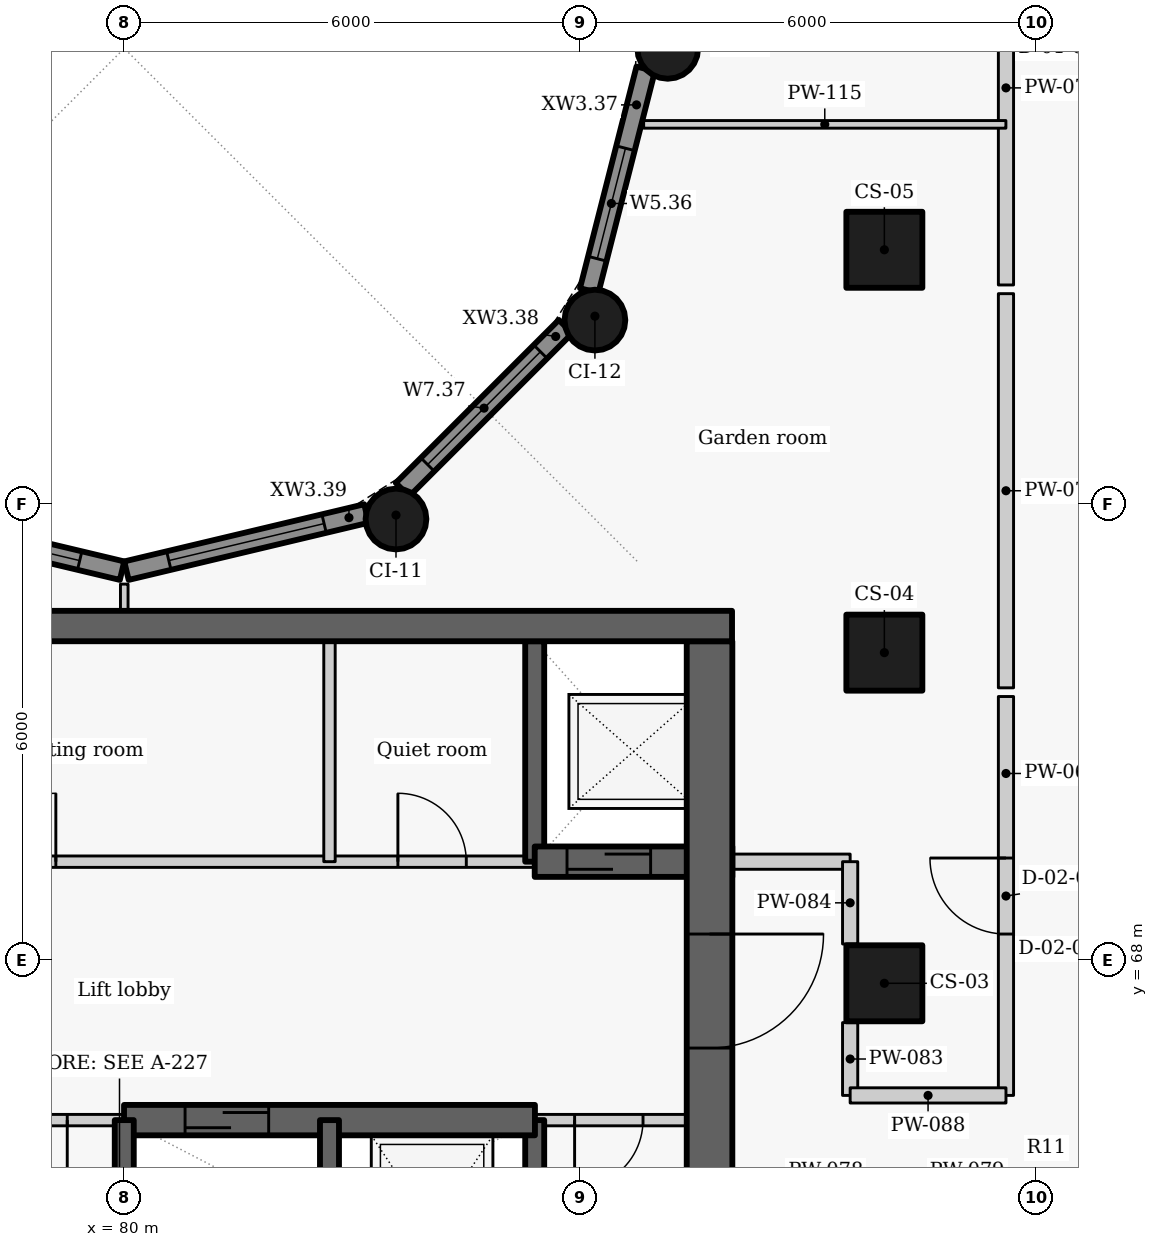
"""IFC4 building model, lengths in metres.
Left out: names, types, materials, properties, quantities, classifications, styles, units other than length and angle.
Written with IfcOpenShell. Run it as: python <this file> out.ifc"""

import sys

from ifc_helpers import new_model, si_unit, direction, frame, frame_2d, origin, origin_2d, place, context, subcontext, project, spatial, rectangle, circle, extrude, element, fill, save


model = new_model("IFC4")
c1 = context("Model", 3, precision=1e-05, world=origin(), true_north=direction((0.0, 1.0)))
c2 = subcontext(c1, "Body", "Model", "MODEL_VIEW")
j1 = project(units=[si_unit("LENGTHUNIT", "METRE"), si_unit("PLANEANGLEUNIT", "RADIAN")], contexts=[c1])
p1 = place(None, origin())
s1 = spatial("IfcSite", under=j1, at=p1, CompositionType="ELEMENT")
p2 = place(p1, origin())
s2 = spatial("IfcBuilding", under=s1, at=p2, CompositionType="ELEMENT")
p3 = place(p2, frame((0.0, 0.0, 150.3)))
s3 = spatial("IfcBuildingStorey", under=s2, at=p3, CompositionType="ELEMENT", Elevation=150.3)
for number, where, z_axis, x_axis in (
    (1, (90.0, 67.7, 0.0), (0.0, 0.0, 1.0), (0.0, 1.0, 0.0)),
    (2, (90.0, 72.05, 0.0), (0.0, 0.0, 1.0), (0.0, 1.0, 0.0)),
    (3, (90.0, 77.35, 0.0), (0.0, 0.0, 1.0), (0.0, 1.0, 0.0)),
):
    element("IfcColumn", number, at=place(p3, frame(where, z_axis=z_axis, x_axis=x_axis)), inside=s3, PredefinedType="COLUMN", context=c2, shape_type="SweptSolid", body=[
        extrude(rectangle(XDim=1.0, YDim=1.0, at=origin_2d()), origin(), (0.0, 0.0, 1.0), 3.3),
    ])
for number, where, z_axis, x_axis in (
    (4, (87.15, 80.0, 0.0), (0.0, 0.0, 1.0), (0.0, 1.0, 0.0)),
    (5, (83.575, 73.808, 0.0), (0.0, 0.0, 1.0), (0.866, 0.5, 0.0)),
    (6, (86.192, 76.425, 0.0), (0.0, 0.0, 1.0), (0.5, 0.866, 0.0)),
):
    element("IfcColumn", number, at=place(p3, frame(where, z_axis=z_axis, x_axis=x_axis)), inside=s3, PredefinedType="COLUMN", context=c2, shape_type="SweptSolid", body=[
        extrude(circle(Radius=0.4, at=origin_2d()), origin(), (0.0, 0.0, 1.0), 3.3),
    ])
p4 = place(p3, frame((86.86, 79.73, 0.0), z_axis=(0.0, 0.0, 1.0), x_axis=(-0.247055971283, -0.969001211069, 0.0)))
e7 = element("IfcWall", 7, at=p4, inside=s3, PredefinedType="SOLIDWALL", context=c2, shape_type="SweptSolid", body=[
    extrude(rectangle(XDim=3.01, YDim=0.25, at=frame_2d((1.505, 0.0))), origin(), (0.0, 0.0, 1.0), 2.425),
])
p5 = place(p4, frame((1.077, 0.0, 0.9)))
e8 = element("IfcOpeningElement", 8, at=p5, cuts=e7, PredefinedType="OPENING", context=c2, shape_type="SweptSolid", body=[
    extrude(rectangle(XDim=1.5, YDim=1.1, at=frame_2d((0.75, 0.55))), frame((0.0, 0.135, 0.0), z_axis=(0.0, -1.0, 0.0), x_axis=(1.0, 0.0, 0.0)), (0.0, 0.0, 1.0), 0.27),
])
p6 = place(p3, frame((85.806, 76.339, 0.0), z_axis=(0.0, 0.0, 1.0), x_axis=(-0.707106781187, -0.707106781187, 0.0)))
e9 = element("IfcWall", 9, at=p6, inside=s3, PredefinedType="SOLIDWALL", context=c2, shape_type="SweptSolid", body=[
    extrude(rectangle(XDim=3.033, YDim=0.25, at=frame_2d((1.517, 0.0))), origin(), (0.0, 0.0, 1.0), 2.425),
])
p7 = place(p6, frame((0.467, 0.0, 0.9)))
e10 = element("IfcOpeningElement", 10, at=p7, cuts=e9, PredefinedType="OPENING", context=c2, shape_type="SweptSolid", body=[
    extrude(rectangle(XDim=2.1, YDim=1.1, at=frame_2d((1.05, 0.55))), frame((0.0, 0.135, 0.0), z_axis=(0.0, -1.0, 0.0), x_axis=(1.0, 0.0, 0.0)), (0.0, 0.0, 1.0), 0.27),
])
p8 = place(p3, frame((83.186, 73.881, 0.0), z_axis=(0.0, 0.0, 1.0), x_axis=(-0.972773113459, -0.231759508395, 0.0)))
e11 = element("IfcWall", 11, at=p8, inside=s3, PredefinedType="SOLIDWALL", context=c2, shape_type="SweptSolid", body=[
    extrude(rectangle(XDim=3.246, YDim=0.25, at=frame_2d((1.623, 0.0))), origin(), (0.0, 0.0, 1.0), 2.425),
])
p9 = place(p8, frame((0.573, 0.0, 0.9)))
e12 = element("IfcOpeningElement", 12, at=p9, cuts=e11, PredefinedType="OPENING", context=c2, shape_type="SweptSolid", body=[
    extrude(rectangle(XDim=2.1, YDim=1.1, at=frame_2d((1.05, 0.55))), frame((0.0, 0.135, 0.0), z_axis=(0.0, -1.0, 0.0), x_axis=(1.0, 0.0, 0.0)), (0.0, 0.0, 1.0), 0.27),
])
p10 = place(p3, frame((79.971, 73.128, 0.0), z_axis=(0.0, 0.0, 1.0), x_axis=(-0.972773113459, 0.231759508395, 0.0)))
e13 = element("IfcWall", 13, at=p10, inside=s3, PredefinedType="SOLIDWALL", context=c2, shape_type="SweptSolid", body=[
    extrude(rectangle(XDim=3.246, YDim=0.25, at=frame_2d((1.623, 0.0))), origin(), (0.0, 0.0, 1.0), 2.425),
])
p11 = place(p10, frame((0.573, 0.0, 0.9)))
e14 = element("IfcOpeningElement", 14, at=p11, cuts=e13, PredefinedType="OPENING", context=c2, shape_type="SweptSolid", body=[
    extrude(rectangle(XDim=2.1, YDim=1.1, at=frame_2d((1.05, 0.55))), frame((0.0, 0.135, 0.0), z_axis=(0.0, -1.0, 0.0), x_axis=(1.0, 0.0, 0.0)), (0.0, 0.0, 1.0), 0.27),
])
p12 = place(p3, frame((72.0, 69.3, 0.0), z_axis=(0.0, 0.0, 1.0), x_axis=(1.0, 0.0, 0.0)))
e15 = element("IfcWall", 15, at=p12, inside=s3, PredefinedType="PARTITIONING", context=c2, shape_type="SweptSolid", body=[
    extrude(rectangle(XDim=13.4, YDim=0.15, at=frame_2d((6.7, 0.0))), origin(), (0.0, 0.0, 1.0), 3.025),
])
p13 = place(p12, frame((1.175, 0.0, 0.0)))
e16 = element("IfcOpeningElement", 16, at=p13, cuts=e15, PredefinedType="OPENING", context=c2, shape_type="SweptSolid", body=[
    extrude(rectangle(XDim=0.9, YDim=2.1, at=frame_2d((0.45, 1.05))), frame((0.0, 0.085, 0.0), z_axis=(0.0, -1.0, 0.0), x_axis=(1.0, 0.0, 0.0)), (0.0, 0.0, 1.0), 0.17),
])
p14 = place(p12, frame((6.2, 0.0, 0.0)))
e17 = element("IfcOpeningElement", 17, at=p14, cuts=e15, PredefinedType="OPENING", context=c2, shape_type="SweptSolid", body=[
    extrude(rectangle(XDim=0.9, YDim=2.1, at=frame_2d((0.45, 1.05))), frame((0.0, 0.085, 0.0), z_axis=(0.0, -1.0, 0.0), x_axis=(1.0, 0.0, 0.0)), (0.0, 0.0, 1.0), 0.17),
])
p15 = place(p12, frame((11.6, 0.0, 0.0)))
e18 = element("IfcOpeningElement", 18, at=p15, cuts=e15, PredefinedType="OPENING", context=c2, shape_type="SweptSolid", body=[
    extrude(rectangle(XDim=0.9, YDim=2.1, at=frame_2d((0.45, 1.05))), frame((0.0, 0.085, 0.0), z_axis=(0.0, -1.0, 0.0), x_axis=(1.0, 0.0, 0.0)), (0.0, 0.0, 1.0), 0.17),
])
p16 = place(p3, frame((85.4, 63.1, -0.275), z_axis=(0.0, 0.0, 1.0), x_axis=(0.0, 1.0, 0.0)))
e19 = element("IfcWall", 19, at=p16, inside=s3, PredefinedType="SHEAR", context=c2, shape_type="SweptSolid", body=[
    extrude(rectangle(XDim=2.8, YDim=0.25, at=frame_2d((1.4, 0.0))), origin(), (0.0, 0.0, 1.0), 3.3),
])
p17 = place(p3, frame((85.4, 69.3, -0.275), z_axis=(0.0, 0.0, 1.0), x_axis=(0.0, 1.0, 0.0)))
e20 = element("IfcWall", 20, at=p17, inside=s3, PredefinedType="SHEAR", context=c2, shape_type="SweptSolid", body=[
    extrude(rectangle(XDim=2.9, YDim=0.25, at=frame_2d((1.45, 0.0))), origin(), (0.0, 0.0, 1.0), 3.3),
])
p18 = place(p3, frame((85.4, 69.3, -0.275), z_axis=(0.0, 0.0, 1.0), x_axis=(1.0, 0.0, 0.0)))
e21 = element("IfcWall", 21, at=p18, inside=s3, PredefinedType="SHEAR", context=c2, shape_type="SweptSolid", body=[
    extrude(rectangle(XDim=2.6, YDim=0.4, at=frame_2d((1.3, 0.0))), origin(), (0.0, 0.0, 1.0), 3.3),
])
p19 = place(p18, frame((0.425, 0.0, 0.275)))
e22 = element("IfcOpeningElement", 22, at=p19, cuts=e21, PredefinedType="OPENING", context=c2, shape_type="SweptSolid", body=[
    extrude(rectangle(XDim=1.1, YDim=2.1, at=frame_2d((0.55, 1.05))), frame((0.0, 0.21, 0.0), z_axis=(0.0, -1.0, 0.0), x_axis=(1.0, 0.0, 0.0)), (0.0, 0.0, 1.0), 0.42),
])
p20 = place(p3, frame((87.7, 72.2, -0.275), z_axis=(0.0, 0.0, 1.0), x_axis=(0.0, -1.0, 0.0)))
e23 = element("IfcWall", 23, at=p20, inside=s3, PredefinedType="SHEAR", context=c2, shape_type="SweptSolid", body=[
    extrude(rectangle(XDim=15.6, YDim=0.6, at=frame_2d((7.8, 0.0))), origin(), (0.0, 0.0, 1.0), 3.3),
])
p21 = place(p20, frame((3.852, 0.0, 0.275)))
e24 = element("IfcOpeningElement", 24, at=p21, cuts=e23, PredefinedType="OPENING", context=c2, shape_type="SweptSolid", body=[
    extrude(rectangle(XDim=1.5, YDim=2.1, at=frame_2d((0.75, 1.05))), frame((0.0, 0.31, 0.0), z_axis=(0.0, -1.0, 0.0), x_axis=(1.0, 0.0, 0.0)), (0.0, 0.0, 1.0), 0.62),
])
p22 = place(p3, frame((82.7, 69.3, 0.0), z_axis=(0.0, 0.0, 1.0), x_axis=(0.0, 1.0, 0.0)))
e25 = element("IfcWall", 25, at=p22, inside=s3, PredefinedType="PARTITIONING", context=c2, shape_type="SweptSolid", body=[
    extrude(rectangle(XDim=2.9, YDim=0.15, at=frame_2d((1.45, 0.0))), origin(), (0.0, 0.0, 1.0), 3.025),
])
p23 = place(p3, frame((80.003, 65.9, 0.0), z_axis=(0.0, 0.0, 1.0), x_axis=(-1.0, 0.0, 0.0)))
e26 = element("IfcWall", 26, at=p23, inside=s3, PredefinedType="PARTITIONING", context=c2, shape_type="SweptSolid", body=[
    extrude(rectangle(XDim=2.706, YDim=0.15, at=frame_2d((1.353, 0.0))), origin(), (0.0, 0.0, 1.0), 3.025),
])
p24 = place(p23, frame((0.753, 0.0, 0.0)))
e27 = element("IfcOpeningElement", 27, at=p24, cuts=e26, PredefinedType="OPENING", context=c2, shape_type="SweptSolid", body=[
    extrude(rectangle(XDim=1.2, YDim=2.1, at=frame_2d((0.6, 1.05))), frame((0.0, 0.085, 0.0), z_axis=(0.0, -1.0, 0.0), x_axis=(1.0, 0.0, 0.0)), (0.0, 0.0, 1.0), 0.17),
])
p25 = place(p3, frame((88.0, 65.9, 0.0), z_axis=(0.0, 0.0, 1.0), x_axis=(-1.0, 0.0, 0.0)))
e28 = element("IfcWall", 28, at=p25, inside=s3, PredefinedType="PARTITIONING", context=c2, shape_type="SweptSolid", body=[
    extrude(rectangle(XDim=2.603, YDim=0.15, at=frame_2d((1.302, 0.0))), origin(), (0.0, 0.0, 1.0), 3.025),
])
p26 = place(p25, frame((1.175, 0.0, 0.0)))
e29 = element("IfcOpeningElement", 29, at=p26, cuts=e28, PredefinedType="OPENING", context=c2, shape_type="SweptSolid", body=[
    extrude(rectangle(XDim=0.9, YDim=2.1, at=frame_2d((0.45, 1.05))), frame((0.0, 0.085, 0.0), z_axis=(0.0, -1.0, 0.0), x_axis=(1.0, 0.0, 0.0)), (0.0, 0.0, 1.0), 0.17),
])
p27 = place(p3, frame((79.997, 65.9, -0.275), z_axis=(0.0, 0.0, 1.0), x_axis=(1.0, 0.0, 0.0)))
e30 = element("IfcWall", 30, at=p27, inside=s3, PredefinedType="SHEAR", context=c2, shape_type="SweptSolid", body=[
    extrude(rectangle(XDim=5.406, YDim=0.4, at=frame_2d((2.703, 0.0))), origin(), (0.0, 0.0, 1.0), 3.3),
])
p28 = place(p27, frame((0.803, 0.0, 0.275)))
e31 = element("IfcOpeningElement", 31, at=p28, cuts=e30, PredefinedType="OPENING", context=c2, shape_type="SweptSolid", body=[
    extrude(rectangle(XDim=1.1, YDim=2.1, at=frame_2d((0.55, 1.05))), frame((0.0, 0.21, 0.0), z_axis=(0.0, -1.0, 0.0), x_axis=(1.0, 0.0, 0.0)), (0.0, 0.0, 1.0), 0.42),
])
for number, where, z_axis, x_axis in (
    (32, (80.0, 63.1, -0.275), (0.0, 0.0, 1.0), (0.0, 1.0, 0.0)),
    (33, (82.7, 63.1, -0.275), (0.0, 0.0, 1.0), (0.0, 1.0, 0.0)),
):
    element("IfcWall", number, at=place(p3, frame(where, z_axis=z_axis, x_axis=x_axis)), inside=s3, PredefinedType="SHEAR", context=c2, shape_type="SweptSolid", body=[
        extrude(rectangle(XDim=2.8, YDim=0.25, at=frame_2d((1.4, 0.0))), origin(), (0.0, 0.0, 1.0), 3.3),
    ])
p29 = place(p3, frame((91.6, 66.225, 0.0), z_axis=(0.0, 0.0, 1.0), x_axis=(0.0, 1.0, 0.0)))
e34 = element("IfcWall", 34, at=p29, inside=s3, PredefinedType="PARTITIONING", context=c2, shape_type="SweptSolid", body=[
    extrude(rectangle(XDim=5.248, YDim=0.2, at=frame_2d((2.624, 0.0))), origin(), (0.0, 0.0, 1.0), 3.025),
])
p30 = place(p29, frame((2.123, 0.0, 0.0)))
e35 = element("IfcOpeningElement", 35, at=p30, cuts=e34, PredefinedType="OPENING", context=c2, shape_type="SweptSolid", body=[
    extrude(rectangle(XDim=1.0, YDim=2.1, at=frame_2d((0.5, 1.05))), frame((0.0, 0.11, 0.0), z_axis=(0.0, -1.0, 0.0), x_axis=(1.0, 0.0, 0.0)), (0.0, 0.0, 1.0), 0.22),
])
for number, where, z_axis, x_axis in (
    (36, (91.6, 71.587, 0.0), (0.0, 0.0, 1.0), (0.0, 1.0, 0.0)),
    (37, (91.6, 76.887, 0.0), (0.0, 0.0, 1.0), (0.0, 1.0, 0.0)),
):
    element("IfcWall", number, at=place(p3, frame(where, z_axis=z_axis, x_axis=x_axis)), inside=s3, PredefinedType="PARTITIONING", context=c2, shape_type="SweptSolid", body=[
        extrude(rectangle(XDim=5.186, YDim=0.2, at=frame_2d((2.593, 0.0))), origin(), (0.0, 0.0, 1.0), 3.025),
    ])
p31 = place(p3, frame((88.0, 69.3, 0.0), z_axis=(0.0, 0.0, 1.0), x_axis=(1.0, 0.0, 0.0)))
e38 = element("IfcWall", 38, at=p31, inside=s3, PredefinedType="PARTITIONING", context=c2, shape_type="SweptSolid", body=[
    extrude(rectangle(XDim=1.55, YDim=0.2, at=frame_2d((0.775, 0.0))), origin(), (0.0, 0.0, 1.0), 3.025),
])
p32 = place(p3, frame((89.55, 66.225, 0.0), z_axis=(0.0, 0.0, 1.0), x_axis=(0.0, 1.0, 0.0)))
e39 = element("IfcWall", 39, at=p32, inside=s3, PredefinedType="PARTITIONING", context=c2, shape_type="SweptSolid", body=[
    extrude(rectangle(XDim=0.958, YDim=0.2, at=frame_2d((0.479, 0.0))), origin(), (0.0, 0.0, 1.0), 3.025),
])
p33 = place(p3, frame((89.55, 68.217, 0.0), z_axis=(0.0, 0.0, 1.0), x_axis=(0.0, 1.0, 0.0)))
e40 = element("IfcWall", 40, at=p33, inside=s3, PredefinedType="PARTITIONING", context=c2, shape_type="SweptSolid", body=[
    extrude(rectangle(XDim=1.083, YDim=0.2, at=frame_2d((0.542, 0.0))), origin(), (0.0, 0.0, 1.0), 3.025),
])
p34 = place(p3, frame((89.55, 66.225, 0.0), z_axis=(0.0, 0.0, 1.0), x_axis=(1.0, 0.0, 0.0)))
e41 = element("IfcWall", 41, at=p34, inside=s3, PredefinedType="PARTITIONING", context=c2, shape_type="SweptSolid", body=[
    extrude(rectangle(XDim=2.05, YDim=0.2, at=frame_2d((1.025, 0.0))), origin(), (0.0, 0.0, 1.0), 2.505),
])
p35 = place(p3, frame((80.0, 72.6, 0.0), z_axis=(0.0, 0.0, 1.0), x_axis=(0.0, 1.0, 0.0)))
e42 = element("IfcWall", 42, at=p35, inside=s3, PredefinedType="PARTITIONING", context=c2, shape_type="SweptSolid", body=[
    extrude(rectangle(XDim=0.352, YDim=0.1, at=frame_2d((0.176, 0.0))), origin(), (0.0, 0.0, 1.0), 3.025),
])
p36 = place(p3, frame((86.833, 79.0, 0.0), z_axis=(0.0, 0.0, 1.0), x_axis=(1.0, 0.0, 0.0)))
e43 = element("IfcWall", 43, at=p36, inside=s3, PredefinedType="PARTITIONING", context=c2, shape_type="SweptSolid", body=[
    extrude(rectangle(XDim=4.766, YDim=0.1, at=frame_2d((2.383, 0.0))), origin(), (0.0, 0.0, 1.0), 2.505),
])
p37 = place(p3, frame((72.004, 72.4, -0.275), z_axis=(0.0, 0.0, 1.0), x_axis=(1.0, 0.0, 0.0)))
e44 = element("IfcWall", 44, at=p37, inside=s3, PredefinedType="SHEAR", context=c2, shape_type="SweptSolid", body=[
    extrude(rectangle(XDim=15.992, YDim=0.4, at=frame_2d((7.996, 0.0))), origin(), (0.0, 0.0, 1.0), 3.3),
])
p38 = place(p5, origin())
e45 = element("IfcWindow", 45, at=p38, inside=s3, PartitioningType="SINGLE_PANEL", PredefinedType="WINDOW", context=c2, shape_type="SweptSolid", body=[
    extrude(rectangle(XDim=1.5, YDim=1.1, at=frame_2d((0.75, 0.55))), frame((0.0, 0.03, 0.0), z_axis=(0.0, -1.0, 0.0), x_axis=(1.0, 0.0, 0.0)), (0.0, 0.0, 1.0), 0.06),
])
fill(e8, e45)
p39 = place(p7, origin())
e46 = element("IfcWindow", 46, at=p39, inside=s3, PartitioningType="SINGLE_PANEL", PredefinedType="WINDOW", context=c2, shape_type="SweptSolid", body=[
    extrude(rectangle(XDim=2.1, YDim=1.1, at=frame_2d((1.05, 0.55))), frame((0.0, 0.03, 0.0), z_axis=(0.0, -1.0, 0.0), x_axis=(1.0, 0.0, 0.0)), (0.0, 0.0, 1.0), 0.06),
])
fill(e10, e46)
p40 = place(p9, origin())
e47 = element("IfcWindow", 47, at=p40, inside=s3, PartitioningType="SINGLE_PANEL", PredefinedType="WINDOW", context=c2, shape_type="SweptSolid", body=[
    extrude(rectangle(XDim=2.1, YDim=1.1, at=frame_2d((1.05, 0.55))), frame((0.0, 0.03, 0.0), z_axis=(0.0, -1.0, 0.0), x_axis=(1.0, 0.0, 0.0)), (0.0, 0.0, 1.0), 0.06),
])
fill(e12, e47)
p41 = place(p11, origin())
e48 = element("IfcWindow", 48, at=p41, inside=s3, PartitioningType="SINGLE_PANEL", PredefinedType="WINDOW", context=c2, shape_type="SweptSolid", body=[
    extrude(rectangle(XDim=2.1, YDim=1.1, at=frame_2d((1.05, 0.55))), frame((0.0, 0.03, 0.0), z_axis=(0.0, -1.0, 0.0), x_axis=(1.0, 0.0, 0.0)), (0.0, 0.0, 1.0), 0.06),
])
fill(e14, e48)
p42 = place(p19, origin())
e49 = element("IfcDoor", 49, at=p42, inside=s3, OperationType="SLIDING_TO_LEFT", PredefinedType="DOOR", context=c2, shape_type="SweptSolid", body=[
    extrude(rectangle(XDim=1.1, YDim=2.1, at=frame_2d((0.55, 1.05))), frame((0.0, 0.025, 0.0), z_axis=(0.0, -1.0, 0.0), x_axis=(1.0, 0.0, 0.0)), (0.0, 0.0, 1.0), 0.05),
])
fill(e22, e49)
p43 = place(p14, origin())
e50 = element("IfcDoor", 50, at=p43, inside=s3, OperationType="SINGLE_SWING_RIGHT", PredefinedType="DOOR", context=c2, shape_type="SweptSolid", body=[
    extrude(rectangle(XDim=0.9, YDim=2.1, at=frame_2d((0.45, 1.05))), frame((0.0, 0.025, 0.0), z_axis=(0.0, -1.0, 0.0), x_axis=(1.0, 0.0, 0.0)), (0.0, 0.0, 1.0), 0.05),
])
fill(e17, e50)
p44 = place(p15, origin())
e51 = element("IfcDoor", 51, at=p44, inside=s3, OperationType="SINGLE_SWING_LEFT", PredefinedType="DOOR", context=c2, shape_type="SweptSolid", body=[
    extrude(rectangle(XDim=0.9, YDim=2.1, at=frame_2d((0.45, 1.05))), frame((0.0, 0.025, 0.0), z_axis=(0.0, -1.0, 0.0), x_axis=(1.0, 0.0, 0.0)), (0.0, 0.0, 1.0), 0.05),
])
fill(e18, e51)
p45 = place(p24, origin())
e52 = element("IfcDoor", 52, at=p45, inside=s3, OperationType="DOUBLE_DOOR_SINGLE_SWING", PredefinedType="DOOR", context=c2, shape_type="SweptSolid", body=[
    extrude(rectangle(XDim=1.2, YDim=2.1, at=frame_2d((0.6, 1.05))), frame((0.0, 0.025, 0.0), z_axis=(0.0, -1.0, 0.0), x_axis=(1.0, 0.0, 0.0)), (0.0, 0.0, 1.0), 0.05),
])
fill(e27, e52)
p46 = place(p28, origin())
e53 = element("IfcDoor", 53, at=p46, inside=s3, OperationType="SLIDING_TO_LEFT", PredefinedType="DOOR", context=c2, shape_type="SweptSolid", body=[
    extrude(rectangle(XDim=1.1, YDim=2.1, at=frame_2d((0.55, 1.05))), frame((0.0, 0.025, 0.0), z_axis=(0.0, -1.0, 0.0), x_axis=(1.0, 0.0, 0.0)), (0.0, 0.0, 1.0), 0.05),
])
fill(e31, e53)
p47 = place(p26, origin())
e54 = element("IfcDoor", 54, at=p47, inside=s3, OperationType="SINGLE_SWING_RIGHT", PredefinedType="DOOR", context=c2, shape_type="SweptSolid", body=[
    extrude(rectangle(XDim=0.9, YDim=2.1, at=frame_2d((0.45, 1.05))), frame((0.0, 0.025, 0.0), z_axis=(0.0, -1.0, 0.0), x_axis=(1.0, 0.0, 0.0)), (0.0, 0.0, 1.0), 0.05),
])
fill(e29, e54)
p48 = place(p30, origin())
e55 = element("IfcDoor", 55, at=p48, inside=s3, OperationType="SINGLE_SWING_RIGHT", PredefinedType="DOOR", context=c2, shape_type="SweptSolid", body=[
    extrude(rectangle(XDim=1.0, YDim=2.1, at=frame_2d((0.5, 1.05))), frame((0.0, 0.025, 0.0), z_axis=(0.0, -1.0, 0.0), x_axis=(1.0, 0.0, 0.0)), (0.0, 0.0, 1.0), 0.05),
])
fill(e35, e55)
p49 = place(p21, origin())
e56 = element("IfcDoor", 56, at=p49, inside=s3, OperationType="DOUBLE_DOOR_SINGLE_SWING", PredefinedType="DOOR", context=c2, shape_type="SweptSolid", body=[
    extrude(rectangle(XDim=1.5, YDim=2.1, at=frame_2d((0.75, 1.05))), frame((0.0, 0.025, 0.0), z_axis=(0.0, -1.0, 0.0), x_axis=(1.0, 0.0, 0.0)), (0.0, 0.0, 1.0), 0.05),
])
fill(e24, e56)
save(model, sys.argv[1])
